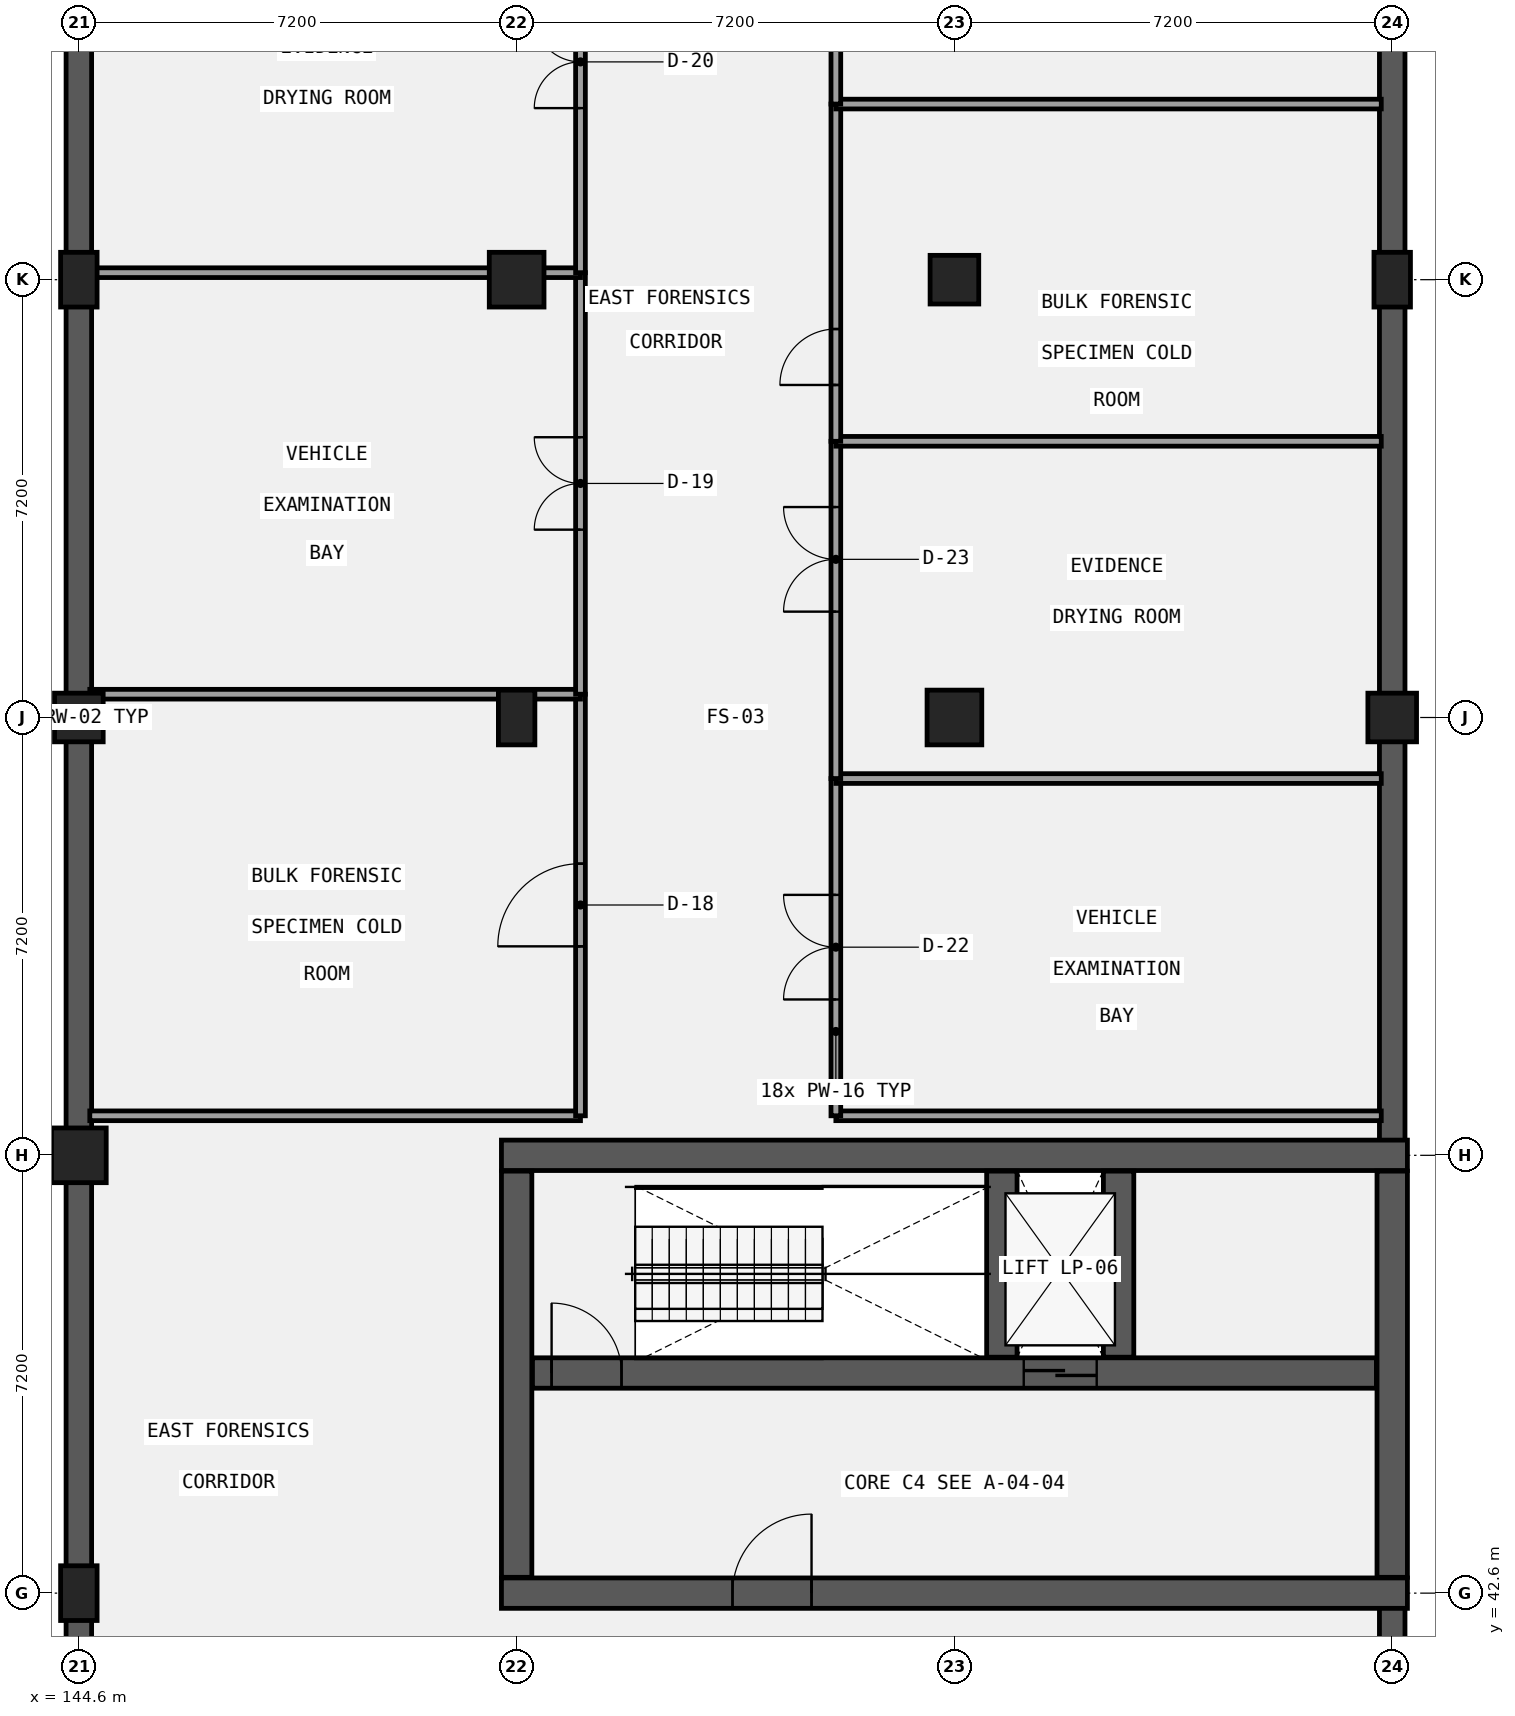
"""IFC4 building model, lengths in metres.
Left out: names, types, materials, properties, quantities, classifications, styles, units other than length and angle.
Written with IfcOpenShell. Run it as: python <this file> out.ifc"""

import sys

from ifc_helpers import new_model, si_unit, direction, frame, frame_2d, origin, origin_2d, place, context, subcontext, project, spatial, rectangle, extrude, element, fill, save


model = new_model("IFC4")
c1 = context("Model", 3, precision=1e-05, world=origin(), true_north=direction((0.0, 1.0)))
c2 = subcontext(c1, "Body", "Model", "MODEL_VIEW")
j1 = project(units=[si_unit("LENGTHUNIT", "METRE"), si_unit("PLANEANGLEUNIT", "RADIAN")], contexts=[c1])
p1 = place(None, origin())
s1 = spatial("IfcSite", under=j1, at=p1, CompositionType="ELEMENT")
p2 = place(p1, origin())
s2 = spatial("IfcBuilding", under=s1, at=p2, CompositionType="ELEMENT")
p3 = place(p2, frame((0.0, 0.0, -4.2)))
s3 = spatial("IfcBuildingStorey", under=s2, at=p3, CompositionType="ELEMENT", Elevation=-4.2)
p4 = place(p3, frame((166.2, 78.4, 0.0), z_axis=(0.0, 0.0, 1.0), x_axis=(0.0, -1.0, 0.0)))
e1 = element("IfcWall", 1, at=p4, inside=s3, PredefinedType="USERDEFINED", context=c2, shape_type="SweptSolid", body=[
    extrude(rectangle(XDim=28.37, YDim=0.42, at=frame_2d((14.185, 0.0))), origin(), (0.0, 0.0, 1.0), 2.88),
])
p5 = place(p3, frame((166.2, 42.37, 0.0), z_axis=(0.0, 0.0, 1.0), x_axis=(0.0, -1.0, 0.0)))
e2 = element("IfcWall", 2, at=p5, inside=s3, PredefinedType="USERDEFINED", context=c2, shape_type="SweptSolid", body=[
    extrude(rectangle(XDim=13.97, YDim=0.42, at=frame_2d((6.985, 0.0))), origin(), (0.0, 0.0, 1.0), 3.08),
])
p6 = place(p3, frame((144.6, 35.6, 0.0), z_axis=(0.0, 0.0, 1.0), x_axis=(0.0, 1.0, 0.0)))
e3 = element("IfcWall", 3, at=p6, inside=s3, PredefinedType="USERDEFINED", context=c2, shape_type="SweptSolid", body=[
    extrude(rectangle(XDim=42.8, YDim=0.42, at=frame_2d((21.4, 0.0))), origin(), (0.0, 0.0, 1.0), 2.98),
])
p7 = place(p3, frame((151.55, 49.8, 0.0), z_axis=(0.0, 0.0, 1.0), x_axis=(1.0, 0.0, 0.0)))
e4 = element("IfcWall", 4, at=p7, inside=s3, PredefinedType="SHEAR", context=c2, shape_type="SweptSolid", body=[
    extrude(rectangle(XDim=14.9, YDim=0.5, at=frame_2d((7.45, 0.0))), origin(), (0.0, 0.0, 1.0), 4.2),
])
p8 = place(p3, frame((151.55, 42.6, 0.0), z_axis=(0.0, 0.0, 1.0), x_axis=(1.0, 0.0, 0.0)))
e5 = element("IfcWall", 5, at=p8, inside=s3, PredefinedType="SHEAR", context=c2, shape_type="SweptSolid", body=[
    extrude(rectangle(XDim=14.9, YDim=0.5, at=frame_2d((7.45, 0.0))), origin(), (0.0, 0.0, 1.0), 4.2),
])
p9 = place(p8, frame((3.8, 0.0, 0.0)))
e6 = element("IfcOpeningElement", 6, at=p9, cuts=e5, PredefinedType="OPENING", context=c2, shape_type="SweptSolid", body=[
    extrude(rectangle(XDim=1.3, YDim=2.2, at=frame_2d((0.65, 1.1))), frame((0.0, 0.26, 0.0), z_axis=(0.0, -1.0, 0.0), x_axis=(1.0, 0.0, 0.0)), (0.0, 0.0, 1.0), 0.52),
])
for number, where, z_axis, x_axis in (
    (7, (151.8, 42.86, 0.0), (0.0, 0.0, 1.0), (0.0, 1.0, 0.0)),
    (8, (166.2, 42.86, 0.0), (0.0, 0.0, 1.0), (0.0, 1.0, 0.0)),
):
    element("IfcWall", number, at=place(p3, frame(where, z_axis=z_axis, x_axis=x_axis)), inside=s3, PredefinedType="SHEAR", context=c2, shape_type="SweptSolid", body=[
        extrude(rectangle(XDim=6.68, YDim=0.5, at=frame_2d((3.34, 0.0))), origin(), (0.0, 0.0, 1.0), 4.2),
    ])
p10 = place(p3, frame((152.06, 46.22, 0.0), z_axis=(0.0, 0.0, 1.0), x_axis=(1.0, 0.0, 0.0)))
e9 = element("IfcWall", 9, at=p10, inside=s3, PredefinedType="SHEAR", context=c2, shape_type="SweptSolid", body=[
    extrude(rectangle(XDim=13.88, YDim=0.5, at=frame_2d((6.94, 0.0))), origin(), (0.0, 0.0, 1.0), 4.2),
])
p11 = place(p10, frame((8.08, 0.0, 0.0)))
e10 = element("IfcOpeningElement", 10, at=p11, cuts=e9, PredefinedType="OPENING", context=c2, shape_type="SweptSolid", body=[
    extrude(rectangle(XDim=1.2, YDim=2.15, at=frame_2d((0.6, 1.075))), frame((0.0, 0.26, 0.0), z_axis=(0.0, -1.0, 0.0), x_axis=(1.0, 0.0, 0.0)), (0.0, 0.0, 1.0), 0.52),
])
p12 = place(p10, frame((0.315, 0.0, 0.0)))
e11 = element("IfcOpeningElement", 11, at=p12, cuts=e9, PredefinedType="OPENING", context=c2, shape_type="SweptSolid", body=[
    extrude(rectangle(XDim=1.15, YDim=2.15, at=frame_2d((0.575, 1.075))), frame((0.0, 0.26, 0.0), z_axis=(0.0, -1.0, 0.0), x_axis=(1.0, 0.0, 0.0)), (0.0, 0.0, 1.0), 0.52),
])
for number, where, z_axis, x_axis in (
    (12, (159.78, 46.48, 0.0), (0.0, 0.0, 1.0), (0.0, 1.0, 0.0)),
    (13, (161.7, 46.48, 0.0), (0.0, 0.0, 1.0), (0.0, 1.0, 0.0)),
):
    element("IfcWall", number, at=place(p3, frame(where, z_axis=z_axis, x_axis=x_axis)), inside=s3, PredefinedType="SHEAR", context=c2, shape_type="SweptSolid", body=[
        extrude(rectangle(XDim=3.06, YDim=0.5, at=frame_2d((1.53, 0.0))), origin(), (0.0, 0.0, 1.0), 4.2),
    ])
p13 = place(p3, frame((144.6, 42.6, 0.0), z_axis=(0.0, 0.0, 1.0), x_axis=(1.0, 0.0, 0.0)))
e14 = element("IfcColumn", 14, at=p13, inside=s3, PredefinedType="COLUMN", context=c2, shape_type="SweptSolid", body=[
    extrude(rectangle(XDim=0.6, YDim=0.9, at=origin_2d()), origin(), (0.0, 0.0, 1.0), 4.2),
])
p14 = place(p3, frame((144.6, 49.8, 0.0), z_axis=(0.0, 0.0, 1.0), x_axis=(1.0, 0.0, 0.0)))
e15 = element("IfcColumn", 15, at=p14, inside=s3, PredefinedType="COLUMN", context=c2, shape_type="SweptSolid", body=[
    extrude(rectangle(XDim=0.9, YDim=0.9, at=origin_2d()), origin(), (0.0, 0.0, 1.0), 4.2),
])
p15 = place(p3, frame((144.6, 57.0, 0.0), z_axis=(0.0, 0.0, 1.0), x_axis=(1.0, 0.0, 0.0)))
e16 = element("IfcColumn", 16, at=p15, inside=s3, PredefinedType="COLUMN", context=c2, shape_type="SweptSolid", body=[
    extrude(rectangle(XDim=0.8, YDim=0.8, at=origin_2d()), origin(), (0.0, 0.0, 1.0), 4.2),
])
for number, where, z_axis, x_axis in (
    (17, (144.6, 64.2, 0.0), (0.0, 0.0, 1.0), (1.0, 0.0, 0.0)),
    (18, (151.8, 57.0, 0.0), (0.0, 0.0, 1.0), (1.0, 0.0, 0.0)),
):
    element("IfcColumn", number, at=place(p3, frame(where, z_axis=z_axis, x_axis=x_axis)), inside=s3, PredefinedType="COLUMN", context=c2, shape_type="SweptSolid", body=[
        extrude(rectangle(XDim=0.6, YDim=0.9, at=origin_2d()), origin(), (0.0, 0.0, 1.0), 4.2),
    ])
for number, where, z_axis, x_axis in (
    (19, (151.8, 64.2, 0.0), (0.0, 0.0, 1.0), (1.0, 0.0, 0.0)),
    (20, (159.0, 57.0, 0.0), (0.0, 0.0, 1.0), (1.0, 0.0, 0.0)),
):
    element("IfcColumn", number, at=place(p3, frame(where, z_axis=z_axis, x_axis=x_axis)), inside=s3, PredefinedType="COLUMN", context=c2, shape_type="SweptSolid", body=[
        extrude(rectangle(XDim=0.9, YDim=0.9, at=origin_2d()), origin(), (0.0, 0.0, 1.0), 4.2),
    ])
for number, where, z_axis, x_axis in (
    (21, (159.0, 64.2, 0.0), (0.0, 0.0, 1.0), (1.0, 0.0, 0.0)),
    (22, (166.2, 57.0, 0.0), (0.0, 0.0, 1.0), (1.0, 0.0, 0.0)),
):
    element("IfcColumn", number, at=place(p3, frame(where, z_axis=z_axis, x_axis=x_axis)), inside=s3, PredefinedType="COLUMN", context=c2, shape_type="SweptSolid", body=[
        extrude(rectangle(XDim=0.8, YDim=0.8, at=origin_2d()), origin(), (0.0, 0.0, 1.0), 4.2),
    ])
p16 = place(p3, frame((166.2, 64.2, 0.0), z_axis=(0.0, 0.0, 1.0), x_axis=(1.0, 0.0, 0.0)))
e23 = element("IfcColumn", 23, at=p16, inside=s3, PredefinedType="COLUMN", context=c2, shape_type="SweptSolid", body=[
    extrude(rectangle(XDim=0.6, YDim=0.9, at=origin_2d()), origin(), (0.0, 0.0, 1.0), 4.2),
])
p17 = place(p3, frame((144.78, 50.45, 0.0), z_axis=(0.0, 0.0, 1.0), x_axis=(1.0, 0.0, 0.0)))
e24 = element("IfcWall", 24, at=p17, inside=s3, PredefinedType="PARTITIONING", context=c2, shape_type="SweptSolid", body=[
    extrude(rectangle(XDim=8.07, YDim=0.16, at=frame_2d((4.035, 0.0))), origin(), (0.0, 0.0, 1.0), 3.88),
])
p18 = place(p3, frame((152.85, 50.45, 0.0), z_axis=(0.0, 0.0, 1.0), x_axis=(0.0, 1.0, 0.0)))
e25 = element("IfcWall", 25, at=p18, inside=s3, PredefinedType="PARTITIONING", context=c2, shape_type="SweptSolid", body=[
    extrude(rectangle(XDim=6.933, YDim=0.16, at=frame_2d((3.467, 0.0))), origin(), (0.0, 0.0, 1.0), 3.88),
])
p19 = place(p18, frame((2.787, 0.0, 0.0)))
e26 = element("IfcOpeningElement", 26, at=p19, cuts=e25, PredefinedType="OPENING", context=c2, shape_type="SweptSolid", body=[
    extrude(rectangle(XDim=1.36, YDim=2.35, at=frame_2d((0.68, 1.175))), frame((0.0, 0.09, 0.0), z_axis=(0.0, -1.0, 0.0), x_axis=(1.0, 0.0, 0.0)), (0.0, 0.0, 1.0), 0.18),
])
p20 = place(p3, frame((144.78, 57.383, 0.0), z_axis=(0.0, 0.0, 1.0), x_axis=(1.0, 0.0, 0.0)))
e27 = element("IfcWall", 27, at=p20, inside=s3, PredefinedType="PARTITIONING", context=c2, shape_type="SweptSolid", body=[
    extrude(rectangle(XDim=8.07, YDim=0.16, at=frame_2d((4.035, 0.0))), origin(), (0.0, 0.0, 1.0), 3.88),
])
p21 = place(p3, frame((152.85, 57.383, 0.0), z_axis=(0.0, 0.0, 1.0), x_axis=(0.0, 1.0, 0.0)))
e28 = element("IfcWall", 28, at=p21, inside=s3, PredefinedType="PARTITIONING", context=c2, shape_type="SweptSolid", body=[
    extrude(rectangle(XDim=6.932, YDim=0.16, at=frame_2d((3.466, 0.0))), origin(), (0.0, 0.0, 1.0), 3.88),
])
p22 = place(p21, frame((2.706, 0.0, 0.0)))
e29 = element("IfcOpeningElement", 29, at=p22, cuts=e28, PredefinedType="OPENING", context=c2, shape_type="SweptSolid", body=[
    extrude(rectangle(XDim=1.52, YDim=2.1, at=frame_2d((0.76, 1.05))), frame((0.0, 0.09, 0.0), z_axis=(0.0, -1.0, 0.0), x_axis=(1.0, 0.0, 0.0)), (0.0, 0.0, 1.0), 0.18),
])
p23 = place(p3, frame((144.78, 64.315, 0.0), z_axis=(0.0, 0.0, 1.0), x_axis=(1.0, 0.0, 0.0)))
e30 = element("IfcWall", 30, at=p23, inside=s3, PredefinedType="PARTITIONING", context=c2, shape_type="SweptSolid", body=[
    extrude(rectangle(XDim=8.07, YDim=0.16, at=frame_2d((4.035, 0.0))), origin(), (0.0, 0.0, 1.0), 3.13),
])
p24 = place(p3, frame((152.85, 64.315, 0.0), z_axis=(0.0, 0.0, 1.0), x_axis=(0.0, 1.0, 0.0)))
e31 = element("IfcWall", 31, at=p24, inside=s3, PredefinedType="PARTITIONING", context=c2, shape_type="SweptSolid", body=[
    extrude(rectangle(XDim=6.933, YDim=0.16, at=frame_2d((3.467, 0.0))), origin(), (0.0, 0.0, 1.0), 3.88),
])
p25 = place(p24, frame((2.707, 0.0, 0.0)))
e32 = element("IfcOpeningElement", 32, at=p25, cuts=e31, PredefinedType="OPENING", context=c2, shape_type="SweptSolid", body=[
    extrude(rectangle(XDim=1.52, YDim=2.22, at=frame_2d((0.76, 1.11))), frame((0.0, 0.09, 0.0), z_axis=(0.0, -1.0, 0.0), x_axis=(1.0, 0.0, 0.0)), (0.0, 0.0, 1.0), 0.18),
])
p26 = place(p3, frame((157.05, 50.45, 0.0), z_axis=(0.0, 0.0, 1.0), x_axis=(1.0, 0.0, 0.0)))
e33 = element("IfcWall", 33, at=p26, inside=s3, PredefinedType="PARTITIONING", context=c2, shape_type="SweptSolid", body=[
    extrude(rectangle(XDim=8.97, YDim=0.16, at=frame_2d((4.485, 0.0))), origin(), (0.0, 0.0, 1.0), 3.88),
])
p27 = place(p3, frame((157.05, 50.45, 0.0), z_axis=(0.0, 0.0, 1.0), x_axis=(0.0, 1.0, 0.0)))
e34 = element("IfcWall", 34, at=p27, inside=s3, PredefinedType="PARTITIONING", context=c2, shape_type="SweptSolid", body=[
    extrude(rectangle(XDim=5.546, YDim=0.16, at=frame_2d((2.773, 0.0))), origin(), (0.0, 0.0, 1.0), 3.88),
])
p28 = place(p27, frame((1.913, 0.0, 0.0)))
e35 = element("IfcOpeningElement", 35, at=p28, cuts=e34, PredefinedType="OPENING", context=c2, shape_type="SweptSolid", body=[
    extrude(rectangle(XDim=1.72, YDim=2.1, at=frame_2d((0.86, 1.05))), frame((0.0, 0.09, 0.0), z_axis=(0.0, -1.0, 0.0), x_axis=(1.0, 0.0, 0.0)), (0.0, 0.0, 1.0), 0.18),
])
p29 = place(p3, frame((157.05, 55.996, 0.0), z_axis=(0.0, 0.0, 1.0), x_axis=(1.0, 0.0, 0.0)))
e36 = element("IfcWall", 36, at=p29, inside=s3, PredefinedType="PARTITIONING", context=c2, shape_type="SweptSolid", body=[
    extrude(rectangle(XDim=8.97, YDim=0.16, at=frame_2d((4.485, 0.0))), origin(), (0.0, 0.0, 1.0), 3.88),
])
p30 = place(p3, frame((157.05, 55.996, 0.0), z_axis=(0.0, 0.0, 1.0), x_axis=(0.0, 1.0, 0.0)))
e37 = element("IfcWall", 37, at=p30, inside=s3, PredefinedType="PARTITIONING", context=c2, shape_type="SweptSolid", body=[
    extrude(rectangle(XDim=5.546, YDim=0.16, at=frame_2d((2.773, 0.0))), origin(), (0.0, 0.0, 1.0), 3.88),
])
p31 = place(p30, frame((2.745, 0.0, 0.0)))
e38 = element("IfcOpeningElement", 38, at=p31, cuts=e37, PredefinedType="OPENING", context=c2, shape_type="SweptSolid", body=[
    extrude(rectangle(XDim=1.72, YDim=2.22, at=frame_2d((0.86, 1.11))), frame((0.0, 0.09, 0.0), z_axis=(0.0, -1.0, 0.0), x_axis=(1.0, 0.0, 0.0)), (0.0, 0.0, 1.0), 0.18),
])
p32 = place(p3, frame((157.05, 61.542, 0.0), z_axis=(0.0, 0.0, 1.0), x_axis=(1.0, 0.0, 0.0)))
e39 = element("IfcWall", 39, at=p32, inside=s3, PredefinedType="PARTITIONING", context=c2, shape_type="SweptSolid", body=[
    extrude(rectangle(XDim=8.97, YDim=0.16, at=frame_2d((4.485, 0.0))), origin(), (0.0, 0.0, 1.0), 3.88),
])
p33 = place(p3, frame((157.05, 61.542, 0.0), z_axis=(0.0, 0.0, 1.0), x_axis=(0.0, 1.0, 0.0)))
e40 = element("IfcWall", 40, at=p33, inside=s3, PredefinedType="PARTITIONING", context=c2, shape_type="SweptSolid", body=[
    extrude(rectangle(XDim=5.546, YDim=0.16, at=frame_2d((2.773, 0.0))), origin(), (0.0, 0.0, 1.0), 3.88),
])
p34 = place(p33, frame((0.927, 0.0, 0.0)))
e41 = element("IfcOpeningElement", 41, at=p34, cuts=e40, PredefinedType="OPENING", context=c2, shape_type="SweptSolid", body=[
    extrude(rectangle(XDim=0.92, YDim=2.1, at=frame_2d((0.46, 1.05))), frame((0.0, 0.09, 0.0), z_axis=(0.0, -1.0, 0.0), x_axis=(1.0, 0.0, 0.0)), (0.0, 0.0, 1.0), 0.18),
])
p35 = place(p3, frame((157.05, 67.088, 0.0), z_axis=(0.0, 0.0, 1.0), x_axis=(1.0, 0.0, 0.0)))
e42 = element("IfcWall", 42, at=p35, inside=s3, PredefinedType="PARTITIONING", context=c2, shape_type="SweptSolid", body=[
    extrude(rectangle(XDim=8.97, YDim=0.16, at=frame_2d((4.485, 0.0))), origin(), (0.0, 0.0, 1.0), 3.88),
])
p36 = place(p3, frame((157.05, 67.088, 0.0), z_axis=(0.0, 0.0, 1.0), x_axis=(0.0, 1.0, 0.0)))
e43 = element("IfcWall", 43, at=p36, inside=s3, PredefinedType="PARTITIONING", context=c2, shape_type="SweptSolid", body=[
    extrude(rectangle(XDim=5.546, YDim=0.16, at=frame_2d((2.773, 0.0))), origin(), (0.0, 0.0, 1.0), 3.88),
])
p37 = place(p36, frame((2.313, 0.0, 0.0)))
e44 = element("IfcOpeningElement", 44, at=p37, cuts=e43, PredefinedType="OPENING", context=c2, shape_type="SweptSolid", body=[
    extrude(rectangle(XDim=0.92, YDim=2.1, at=frame_2d((0.46, 1.05))), frame((0.0, 0.09, 0.0), z_axis=(0.0, -1.0, 0.0), x_axis=(1.0, 0.0, 0.0)), (0.0, 0.0, 1.0), 0.18),
])
p38 = place(p11, frame((1.2, 0.0, 0.0), z_axis=(0.0, 0.0, 1.0), x_axis=(-1.0, 0.0, 0.0)))
e45 = element("IfcDoor", 45, at=p38, inside=s3, OperationType="DOUBLE_DOOR_SLIDING", PredefinedType="DOOR", context=c2, shape_type="SweptSolid", body=[
    extrude(rectangle(XDim=1.2, YDim=2.15, at=frame_2d((0.6, 1.075))), frame((0.0, 0.025, 0.0), z_axis=(0.0, -1.0, 0.0), x_axis=(1.0, 0.0, 0.0)), (0.0, 0.0, 1.0), 0.05),
])
fill(e10, e45)
p39 = place(p12, origin())
e46 = element("IfcDoor", 46, at=p39, inside=s3, OperationType="SINGLE_SWING_LEFT", PredefinedType="DOOR", context=c2, shape_type="SweptSolid", body=[
    extrude(rectangle(XDim=1.15, YDim=2.15, at=frame_2d((0.575, 1.075))), frame((0.0, 0.025, 0.0), z_axis=(0.0, -1.0, 0.0), x_axis=(1.0, 0.0, 0.0)), (0.0, 0.0, 1.0), 0.05),
])
fill(e11, e46)
p40 = place(p9, frame((1.3, 0.0, 0.0), z_axis=(0.0, 0.0, 1.0), x_axis=(-1.0, 0.0, 0.0)))
e47 = element("IfcDoor", 47, at=p40, inside=s3, OperationType="SINGLE_SWING_RIGHT", PredefinedType="DOOR", context=c2, shape_type="SweptSolid", body=[
    extrude(rectangle(XDim=1.3, YDim=2.2, at=frame_2d((0.65, 1.1))), frame((0.0, 0.025, 0.0), z_axis=(0.0, -1.0, 0.0), x_axis=(1.0, 0.0, 0.0)), (0.0, 0.0, 1.0), 0.05),
])
fill(e6, e47)
p41 = place(p19, frame((1.36, 0.0, 0.0), z_axis=(0.0, 0.0, 1.0), x_axis=(-1.0, 0.0, 0.0)))
e48 = element("IfcDoor", 48, at=p41, inside=s3, OperationType="SINGLE_SWING_LEFT", PredefinedType="DOOR", context=c2, shape_type="SweptSolid", body=[
    extrude(rectangle(XDim=1.36, YDim=2.35, at=frame_2d((0.68, 1.175))), frame((0.0, 0.025, 0.0), z_axis=(0.0, -1.0, 0.0), x_axis=(1.0, 0.0, 0.0)), (0.0, 0.0, 1.0), 0.05),
])
fill(e26, e48)
p42 = place(p22, frame((1.52, 0.0, 0.0), z_axis=(0.0, 0.0, 1.0), x_axis=(-1.0, 0.0, 0.0)))
e49 = element("IfcDoor", 49, at=p42, inside=s3, OperationType="DOUBLE_DOOR_SINGLE_SWING", PredefinedType="DOOR", context=c2, shape_type="SweptSolid", body=[
    extrude(rectangle(XDim=1.52, YDim=2.1, at=frame_2d((0.76, 1.05))), frame((0.0, 0.025, 0.0), z_axis=(0.0, -1.0, 0.0), x_axis=(1.0, 0.0, 0.0)), (0.0, 0.0, 1.0), 0.05),
])
fill(e29, e49)
p43 = place(p25, frame((1.52, 0.0, 0.0), z_axis=(0.0, 0.0, 1.0), x_axis=(-1.0, 0.0, 0.0)))
e50 = element("IfcDoor", 50, at=p43, inside=s3, OperationType="DOUBLE_DOOR_SINGLE_SWING", PredefinedType="DOOR", context=c2, shape_type="SweptSolid", body=[
    extrude(rectangle(XDim=1.52, YDim=2.22, at=frame_2d((0.76, 1.11))), frame((0.0, 0.025, 0.0), z_axis=(0.0, -1.0, 0.0), x_axis=(1.0, 0.0, 0.0)), (0.0, 0.0, 1.0), 0.05),
])
fill(e32, e50)
p44 = place(p28, origin())
e51 = element("IfcDoor", 51, at=p44, inside=s3, OperationType="DOUBLE_DOOR_SINGLE_SWING", PredefinedType="DOOR", context=c2, shape_type="SweptSolid", body=[
    extrude(rectangle(XDim=1.72, YDim=2.1, at=frame_2d((0.86, 1.05))), frame((0.0, 0.025, 0.0), z_axis=(0.0, -1.0, 0.0), x_axis=(1.0, 0.0, 0.0)), (0.0, 0.0, 1.0), 0.05),
])
fill(e35, e51)
p45 = place(p31, origin())
e52 = element("IfcDoor", 52, at=p45, inside=s3, OperationType="DOUBLE_DOOR_SINGLE_SWING", PredefinedType="DOOR", context=c2, shape_type="SweptSolid", body=[
    extrude(rectangle(XDim=1.72, YDim=2.22, at=frame_2d((0.86, 1.11))), frame((0.0, 0.025, 0.0), z_axis=(0.0, -1.0, 0.0), x_axis=(1.0, 0.0, 0.0)), (0.0, 0.0, 1.0), 0.05),
])
fill(e38, e52)
p46 = place(p34, origin())
e53 = element("IfcDoor", 53, at=p46, inside=s3, OperationType="SINGLE_SWING_LEFT", PredefinedType="DOOR", context=c2, shape_type="SweptSolid", body=[
    extrude(rectangle(XDim=0.92, YDim=2.1, at=frame_2d((0.46, 1.05))), frame((0.0, 0.025, 0.0), z_axis=(0.0, -1.0, 0.0), x_axis=(1.0, 0.0, 0.0)), (0.0, 0.0, 1.0), 0.05),
])
fill(e41, e53)
save(model, sys.argv[1])
